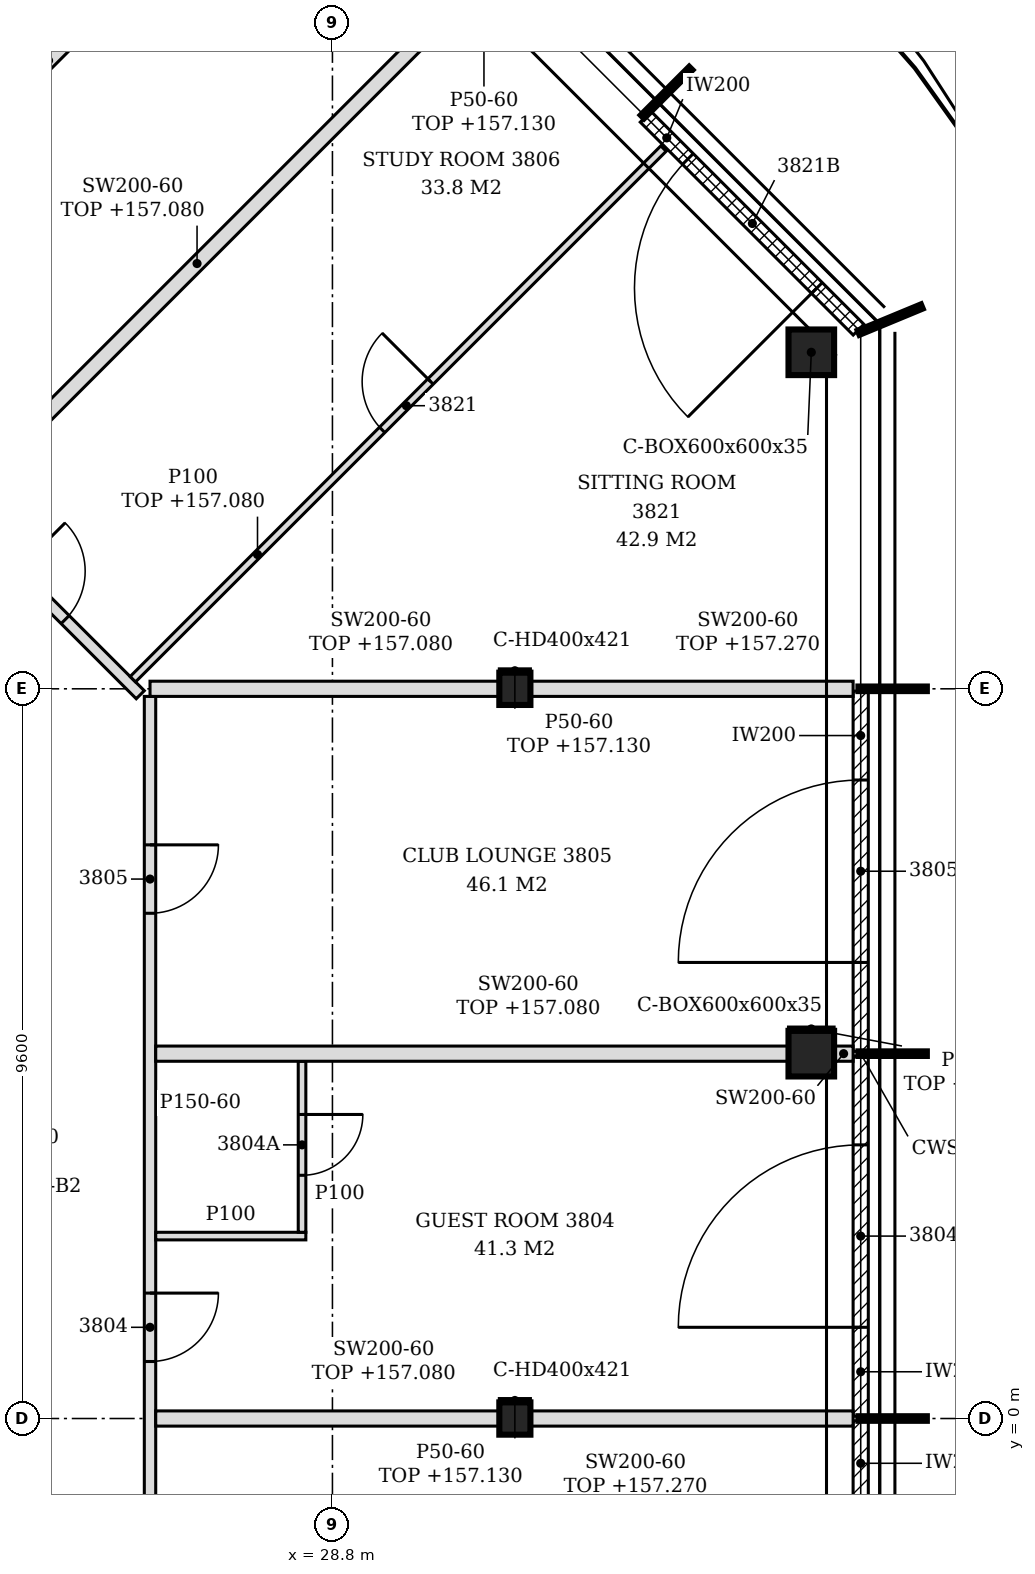
"""IFC4 building model, lengths in metres.
Left out: names, types, materials, properties, quantities, classifications, styles, units other than length and angle.
Written with IfcOpenShell. Run it as: python <this file> out.ifc"""

import sys

from ifc_helpers import new_model, si_unit, direction, frame, frame_2d, origin, origin_2d, place, context, subcontext, project, spatial, polyline, rectangle, hollow_rectangle, i_section, outline, extrude, element, fill, save


model = new_model("IFC4")
c1 = context("Model", 3, precision=1e-05, world=origin(), true_north=direction((0.0, 1.0)))
c2 = subcontext(c1, "Body", "Model", "MODEL_VIEW")
j1 = project(units=[si_unit("LENGTHUNIT", "METRE"), si_unit("PLANEANGLEUNIT", "RADIAN")], contexts=[c1])
p1 = place(None, origin())
s1 = spatial("IfcSite", under=j1, at=p1, CompositionType="ELEMENT")
p2 = place(p1, origin())
s2 = spatial("IfcBuilding", under=s1, at=p2, CompositionType="ELEMENT")
p3 = place(p2, frame((0.0, 0.0, 154.2)))
s3 = spatial("IfcBuildingStorey", under=s2, at=p3, CompositionType="ELEMENT", Elevation=154.2)
for number, where, z_axis, x_axis in (
    (1, (35.1, 4.8, -0.15), (0.0, 0.0, 1.0), (1.0, 0.0, 0.0)),
    (2, (35.1, 14.027, -0.15), (0.0, 0.0, 1.0), (1.0, 0.0, 0.0)),
):
    element("IfcColumn", number, at=place(p3, frame(where, z_axis=z_axis, x_axis=x_axis)), inside=s3, PredefinedType="COLUMN", context=c2, shape_type="SweptSolid", body=[
        extrude(hollow_rectangle(XDim=0.6, YDim=0.6, WallThickness=0.035, at=origin_2d()), origin(), (0.0, 0.0, 1.0), 3.6),
    ])
for number, where, z_axis, x_axis in (
    (3, (31.2, 0.0, -0.15), (0.0, 0.0, 1.0), (1.0, 0.0, 0.0)),
    (4, (31.2, 9.6, -0.15), (0.0, 0.0, 1.0), (1.0, 0.0, 0.0)),
):
    element("IfcColumn", number, at=place(p3, frame(where, z_axis=z_axis, x_axis=x_axis)), inside=s3, PredefinedType="COLUMN", context=c2, shape_type="SweptSolid", body=[
        extrude(i_section(OverallWidth=0.409, OverallDepth=0.425, WebThickness=0.033, FlangeThickness=0.052, FilletRadius=0.015, at=origin_2d()), origin(), (0.0, 0.0, 1.0), 3.6),
    ])
p4 = place(p3, frame((35.75, -4.656, 0.0), z_axis=(0.0, 0.0, 1.0), x_axis=(0.0, 1.0, 0.0)))
e5 = element("IfcWall", 5, at=p4, inside=s3, PredefinedType="NOTDEFINED", context=c2, shape_type="SweptSolid", body=[
    extrude(rectangle(XDim=4.626, YDim=0.2, at=frame_2d((2.313, 0.0))), origin(), (0.0, 0.0, 1.0), 3.45),
])
p5 = place(p4, frame((1.108, 0.0, 0.0)))
e6 = element("IfcOpeningElement", 6, at=p5, cuts=e5, PredefinedType="OPENING", context=c2, shape_type="SweptSolid", body=[
    extrude(rectangle(XDim=2.4, YDim=2.4, at=frame_2d((1.2, 1.2))), frame((0.0, 0.11, 0.0), z_axis=(0.0, -1.0, 0.0), x_axis=(1.0, 0.0, 0.0)), (0.0, 0.0, 1.0), 0.22),
])
p6 = place(p3, frame((35.75, 0.03, 0.0), z_axis=(0.0, 0.0, 1.0), x_axis=(0.0, 1.0, 0.0)))
e7 = element("IfcWall", 7, at=p6, inside=s3, PredefinedType="NOTDEFINED", context=c2, shape_type="SweptSolid", body=[
    extrude(rectangle(XDim=4.74, YDim=0.2, at=frame_2d((2.37, 0.0))), origin(), (0.0, 0.0, 1.0), 3.45),
])
p7 = place(p6, frame((1.17, 0.0, 0.0)))
e8 = element("IfcOpeningElement", 8, at=p7, cuts=e7, PredefinedType="OPENING", context=c2, shape_type="SweptSolid", body=[
    extrude(rectangle(XDim=2.4, YDim=2.4, at=frame_2d((1.2, 1.2))), frame((0.0, 0.11, 0.0), z_axis=(0.0, -1.0, 0.0), x_axis=(1.0, 0.0, 0.0)), (0.0, 0.0, 1.0), 0.22),
])
p8 = place(p3, frame((35.75, 4.83, 0.0), z_axis=(0.0, 0.0, 1.0), x_axis=(0.0, 1.0, 0.0)))
e9 = element("IfcWall", 9, at=p8, inside=s3, PredefinedType="NOTDEFINED", context=c2, shape_type="SweptSolid", body=[
    extrude(rectangle(XDim=4.74, YDim=0.2, at=frame_2d((2.37, 0.0))), origin(), (0.0, 0.0, 1.0), 3.45),
])
p9 = place(p8, frame((1.17, 0.0, 0.0)))
e10 = element("IfcOpeningElement", 10, at=p9, cuts=e9, PredefinedType="OPENING", context=c2, shape_type="SweptSolid", body=[
    extrude(rectangle(XDim=2.4, YDim=2.4, at=frame_2d((1.2, 1.2))), frame((0.0, 0.11, 0.0), z_axis=(0.0, -1.0, 0.0), x_axis=(1.0, 0.0, 0.0)), (0.0, 0.0, 1.0), 0.22),
])
p10 = place(p3, frame((35.722, 14.325, 0.0), z_axis=(0.0, 0.0, 1.0), x_axis=(-0.707106781187, 0.707106781187, 0.0)))
e11 = element("IfcWall", 11, at=p10, inside=s3, PredefinedType="NOTDEFINED", context=c2, shape_type="SweptSolid", body=[
    extrude(rectangle(XDim=3.962, YDim=0.2, at=frame_2d((1.981, 0.0))), origin(), (0.0, 0.0, 1.0), 3.45),
])
p11 = place(p10, frame((0.775, 0.0, 0.0)))
e12 = element("IfcOpeningElement", 12, at=p11, cuts=e11, PredefinedType="OPENING", context=c2, shape_type="SweptSolid", body=[
    extrude(rectangle(XDim=2.4, YDim=2.4, at=frame_2d((1.2, 1.2))), frame((0.0, 0.11, 0.0), z_axis=(0.0, -1.0, 0.0), x_axis=(1.0, 0.0, 0.0)), (0.0, 0.0, 1.0), 0.22),
])
p12 = place(p3, frame((26.4, -4.448, 0.0), z_axis=(0.0, 0.0, 1.0), x_axis=(0.0, 1.0, 0.0)))
e13 = element("IfcWall", 13, at=p12, inside=s3, PredefinedType="PARTITIONING", context=c2, shape_type="SweptSolid", body=[
    extrude(outline(polyline([(0.0, 0.0), (13.948, 0.0), (13.948, 2.88), (13.943, 2.88), (13.941, 3.45), (9.353, 3.45), (9.351, 2.88), (9.143, 2.88), (9.141, 3.45), (4.553, 3.45), (4.551, 2.88), (4.343, 2.88), (4.341, 3.45), (0.0, 3.45), (0.0, 0.0)])), frame((0.0, 0.075, 0.0), z_axis=(0.0, -1.0, 0.0), x_axis=(1.0, 0.0, 0.0)), (0.0, 0.0, 1.0), 0.15),
])
p13 = place(p12, frame((1.701, 0.0, 0.0)))
e14 = element("IfcOpeningElement", 14, at=p13, cuts=e13, PredefinedType="OPENING", context=c2, shape_type="SweptSolid", body=[
    extrude(rectangle(XDim=0.9, YDim=2.1, at=frame_2d((0.45, 1.05))), frame((0.0, 0.085, 0.0), z_axis=(0.0, -1.0, 0.0), x_axis=(1.0, 0.0, 0.0)), (0.0, 0.0, 1.0), 0.17),
])
p14 = place(p12, frame((5.198, 0.0, 0.0)))
e15 = element("IfcOpeningElement", 15, at=p14, cuts=e13, PredefinedType="OPENING", context=c2, shape_type="SweptSolid", body=[
    extrude(rectangle(XDim=0.9, YDim=2.1, at=frame_2d((0.45, 1.05))), frame((0.0, 0.085, 0.0), z_axis=(0.0, -1.0, 0.0), x_axis=(1.0, 0.0, 0.0)), (0.0, 0.0, 1.0), 0.17),
])
p15 = place(p12, frame((11.095, 0.0, 0.0)))
e16 = element("IfcOpeningElement", 16, at=p15, cuts=e13, PredefinedType="OPENING", context=c2, shape_type="SweptSolid", body=[
    extrude(rectangle(XDim=0.9, YDim=2.1, at=frame_2d((0.45, 1.05))), frame((0.0, 0.085, 0.0), z_axis=(0.0, -1.0, 0.0), x_axis=(1.0, 0.0, 0.0)), (0.0, 0.0, 1.0), 0.17),
])
p16 = place(p3, frame((26.475, 0.0, 0.0), z_axis=(0.0, 0.0, 1.0), x_axis=(1.0, 0.0, 0.0)))
e17 = element("IfcWall", 17, at=p16, inside=s3, PredefinedType="PARTITIONING", context=c2, shape_type="SweptSolid", body=[
    extrude(rectangle(XDim=4.521, YDim=0.2, at=frame_2d((2.26, 0.0))), origin(), (0.0, 0.0, 1.0), 2.88),
])
p17 = place(p3, frame((31.405, 0.0, 0.0), z_axis=(0.0, 0.0, 1.0), x_axis=(1.0, 0.0, 0.0)))
e18 = element("IfcWall", 18, at=p17, inside=s3, PredefinedType="PARTITIONING", context=c2, shape_type="SweptSolid", body=[
    extrude(outline(polyline([(0.0, 0.0), (4.245, 0.0), (4.246, 3.07), (3.845, 3.07), (3.844, 2.93), (3.545, 2.93), (3.543, 3.07), (0.0, 3.07), (0.0, 0.0)])), frame((0.0, 0.1, 0.0), z_axis=(0.0, -1.0, 0.0), x_axis=(1.0, 0.0, 0.0)), (0.0, 0.0, 1.0), 0.2),
])
p18 = place(p3, frame((26.475, 2.4, 0.0), z_axis=(0.0, 0.0, 1.0), x_axis=(1.0, 0.0, 0.0)))
e19 = element("IfcWall", 19, at=p18, inside=s3, PredefinedType="PARTITIONING", context=c2, shape_type="SweptSolid", body=[
    extrude(rectangle(XDim=1.975, YDim=0.1, at=frame_2d((0.987, 0.0))), origin(), (0.0, 0.0, 1.0), 3.45),
])
p19 = place(p3, frame((28.4, 2.45, 0.0), z_axis=(0.0, 0.0, 1.0), x_axis=(0.0, 1.0, 0.0)))
e20 = element("IfcWall", 20, at=p19, inside=s3, PredefinedType="PARTITIONING", context=c2, shape_type="SweptSolid", body=[
    extrude(outline(polyline([(0.0, 0.0), (2.25, 0.0), (2.25, 2.88), (2.245, 2.88), (2.243, 3.45), (0.0, 3.45), (0.0, 0.0)])), frame((0.0, 0.05, 0.0), z_axis=(0.0, -1.0, 0.0), x_axis=(1.0, 0.0, 0.0)), (0.0, 0.0, 1.0), 0.1),
])
p20 = place(p19, frame((0.75, 0.0, 0.0)))
e21 = element("IfcOpeningElement", 21, at=p20, cuts=e20, PredefinedType="OPENING", context=c2, shape_type="SweptSolid", body=[
    extrude(rectangle(XDim=0.8, YDim=2.1, at=frame_2d((0.4, 1.05))), frame((0.0, 0.06, 0.0), z_axis=(0.0, -1.0, 0.0), x_axis=(1.0, 0.0, 0.0)), (0.0, 0.0, 1.0), 0.12),
])
p21 = place(p3, frame((26.475, 4.8, 0.0), z_axis=(0.0, 0.0, 1.0), x_axis=(1.0, 0.0, 0.0)))
e22 = element("IfcWall", 22, at=p21, inside=s3, PredefinedType="PARTITIONING", context=c2, shape_type="SweptSolid", body=[
    extrude(rectangle(XDim=8.325, YDim=0.2, at=frame_2d((4.163, 0.0))), origin(), (0.0, 0.0, 1.0), 2.88),
])
p22 = place(p3, frame((35.4, 4.8, 0.0), z_axis=(0.0, 0.0, 1.0), x_axis=(1.0, 0.0, 0.0)))
e23 = element("IfcWall", 23, at=p22, inside=s3, PredefinedType="PARTITIONING", context=c2, shape_type="SweptSolid", body=[
    extrude(rectangle(XDim=0.25, YDim=0.2, at=frame_2d((0.125, 0.0))), origin(), (0.0, 0.0, 1.0), 3.45),
])
p23 = place(p3, frame((26.272, 9.522, 0.0), z_axis=(0.0, 0.0, 1.0), x_axis=(-0.707097742657, 0.707115819601, 0.0)))
e24 = element("IfcWall", 24, at=p23, inside=s3, PredefinedType="PARTITIONING", context=c2, shape_type="SweptSolid", body=[
    extrude(rectangle(XDim=13.506, YDim=0.15, at=frame_2d((6.753, 0.0))), origin(), (0.0, 0.0, 1.0), 2.73),
])
p24 = place(p23, frame((1.398, 0.0, 0.0)))
e25 = element("IfcOpeningElement", 25, at=p24, cuts=e24, PredefinedType="OPENING", context=c2, shape_type="SweptSolid", body=[
    extrude(rectangle(XDim=0.9, YDim=2.1, at=frame_2d((0.45, 1.05))), frame((0.0, 0.085, 0.0), z_axis=(0.0, -1.0, 0.0), x_axis=(1.0, 0.0, 0.0)), (0.0, 0.0, 1.0), 0.17),
])
p25 = place(p23, frame((4.668, 0.0, 0.0)))
e26 = element("IfcOpeningElement", 26, at=p25, cuts=e24, PredefinedType="OPENING", context=c2, shape_type="SweptSolid", body=[
    extrude(rectangle(XDim=0.9, YDim=2.1, at=frame_2d((0.45, 1.05))), frame((0.0, 0.085, 0.0), z_axis=(0.0, -1.0, 0.0), x_axis=(1.0, 0.0, 0.0)), (0.0, 0.0, 1.0), 0.17),
])
p26 = place(p23, frame((7.938, 0.0, 0.0)))
e27 = element("IfcOpeningElement", 27, at=p26, cuts=e24, PredefinedType="OPENING", context=c2, shape_type="SweptSolid", body=[
    extrude(rectangle(XDim=0.9, YDim=2.1, at=frame_2d((0.45, 1.05))), frame((0.0, 0.085, 0.0), z_axis=(0.0, -1.0, 0.0), x_axis=(1.0, 0.0, 0.0)), (0.0, 0.0, 1.0), 0.17),
])
p27 = place(p23, frame((11.405, 0.0, 0.0)))
e28 = element("IfcOpeningElement", 28, at=p27, cuts=e24, PredefinedType="OPENING", context=c2, shape_type="SweptSolid", body=[
    extrude(rectangle(XDim=0.9, YDim=2.1, at=frame_2d((0.45, 1.05))), frame((0.0, 0.085, 0.0), z_axis=(0.0, -1.0, 0.0), x_axis=(1.0, 0.0, 0.0)), (0.0, 0.0, 1.0), 0.17),
])
p28 = place(p3, frame((26.4, 9.6, 0.0), z_axis=(0.0, 0.0, 1.0), x_axis=(1.0, 0.0, 0.0)))
e29 = element("IfcWall", 29, at=p28, inside=s3, PredefinedType="PARTITIONING", context=c2, shape_type="SweptSolid", body=[
    extrude(rectangle(XDim=4.595, YDim=0.2, at=frame_2d((2.298, 0.0))), origin(), (0.0, 0.0, 1.0), 2.88),
])
p29 = place(p3, frame((31.405, 9.6, 0.0), z_axis=(0.0, 0.0, 1.0), x_axis=(1.0, 0.0, 0.0)))
e30 = element("IfcWall", 30, at=p29, inside=s3, PredefinedType="PARTITIONING", context=c2, shape_type="SweptSolid", body=[
    extrude(outline(polyline([(0.0, 0.0), (4.245, 0.0), (4.246, 3.07), (3.845, 3.07), (3.844, 2.93), (3.545, 2.93), (3.543, 3.07), (0.0, 3.07), (0.0, 0.0)])), frame((0.0, 0.1, 0.0), z_axis=(0.0, -1.0, 0.0), x_axis=(1.0, 0.0, 0.0)), (0.0, 0.0, 1.0), 0.2),
])
p30 = place(p3, frame((26.174, 9.726, 0.0), z_axis=(0.0, 0.0, 1.0), x_axis=(0.707106781187, 0.707106781187, 0.0)))
e31 = element("IfcWall", 31, at=p30, inside=s3, PredefinedType="PARTITIONING", context=c2, shape_type="SweptSolid", body=[
    extrude(rectangle(XDim=9.873, YDim=0.1, at=frame_2d((4.937, 0.0))), origin(), (0.0, 0.0, 1.0), 2.88),
])
p31 = place(p30, frame((4.639, 0.0, 0.0)))
e32 = element("IfcOpeningElement", 32, at=p31, cuts=e31, PredefinedType="OPENING", context=c2, shape_type="SweptSolid", body=[
    extrude(rectangle(XDim=0.9, YDim=2.1, at=frame_2d((0.45, 1.05))), frame((0.0, 0.06, 0.0), z_axis=(0.0, -1.0, 0.0), x_axis=(1.0, 0.0, 0.0)), (0.0, 0.0, 1.0), 0.12),
])
p32 = place(p3, frame((23.862, 12.038, 0.0), z_axis=(0.0, 0.0, 1.0), x_axis=(0.707106781187, 0.707106781187, 0.0)))
e33 = element("IfcWall", 33, at=p32, inside=s3, PredefinedType="PARTITIONING", context=c2, shape_type="SweptSolid", body=[
    extrude(rectangle(XDim=8.929, YDim=0.2, at=frame_2d((4.464, 0.0))), origin(), (0.0, 0.0, 1.0), 2.88),
])
p33 = place(p3, frame((21.55, 14.35, 0.0), z_axis=(0.0, 0.0, 1.0), x_axis=(0.707106781187, 0.707106781187, 0.0)))
e34 = element("IfcWall", 34, at=p33, inside=s3, PredefinedType="PARTITIONING", context=c2, shape_type="SweptSolid", body=[
    extrude(rectangle(XDim=9.943, YDim=0.2, at=frame_2d((4.972, 0.0))), origin(), (0.0, 0.0, 1.0), 2.63),
])
p34 = place(p3, frame((19.238, 16.662, 0.0), z_axis=(0.0, 0.0, 1.0), x_axis=(0.707106781187, 0.707106781187, 0.0)))
e35 = element("IfcWall", 35, at=p34, inside=s3, PredefinedType="PARTITIONING", context=c2, shape_type="SweptSolid", body=[
    extrude(rectangle(XDim=8.929, YDim=0.2, at=frame_2d((4.464, 0.0))), origin(), (0.0, 0.0, 1.0), 2.73),
])
p35 = place(p3, frame((30.996, 0.238, 0.0), z_axis=(0.0, 0.0, 1.0), x_axis=(1.0, 0.0, 0.0)))
e36 = element("IfcWall", 36, at=p35, inside=s3, PredefinedType="PARTITIONING", context=c2, shape_type="SweptSolid", body=[
    extrude(rectangle(XDim=0.409, YDim=0.05, at=frame_2d((0.205, 0.0))), origin(), (0.0, 0.0, 1.0), 2.93),
])
p36 = place(p3, frame((34.8, 5.125, 0.0), z_axis=(0.0, 0.0, 1.0), x_axis=(1.0, 0.0, 0.0)))
e37 = element("IfcWall", 37, at=p36, inside=s3, PredefinedType="PARTITIONING", context=c2, shape_type="SweptSolid", body=[
    extrude(rectangle(XDim=0.6, YDim=0.05, at=frame_2d((0.3, 0.0))), origin(), (0.0, 0.0, 1.0), 2.93),
])
p37 = place(p3, frame((30.996, 9.837, 0.0), z_axis=(0.0, 0.0, 1.0), x_axis=(1.0, 0.0, 0.0)))
e38 = element("IfcWall", 38, at=p37, inside=s3, PredefinedType="PARTITIONING", context=c2, shape_type="SweptSolid", body=[
    extrude(rectangle(XDim=0.409, YDim=0.05, at=frame_2d((0.205, 0.0))), origin(), (0.0, 0.0, 1.0), 2.93),
])
p38 = place(p7, origin())
e39 = element("IfcDoor", 39, at=p38, inside=s3, OperationType="SINGLE_SWING_LEFT", PredefinedType="DOOR", context=c2, shape_type="SweptSolid", body=[
    extrude(rectangle(XDim=2.4, YDim=2.4, at=frame_2d((1.2, 1.2))), frame((0.0, 0.025, 0.0), z_axis=(0.0, -1.0, 0.0), x_axis=(1.0, 0.0, 0.0)), (0.0, 0.0, 1.0), 0.05),
])
fill(e8, e39)
p39 = place(p9, origin())
e40 = element("IfcDoor", 40, at=p39, inside=s3, OperationType="SINGLE_SWING_LEFT", PredefinedType="DOOR", context=c2, shape_type="SweptSolid", body=[
    extrude(rectangle(XDim=2.4, YDim=2.4, at=frame_2d((1.2, 1.2))), frame((0.0, 0.025, 0.0), z_axis=(0.0, -1.0, 0.0), x_axis=(1.0, 0.0, 0.0)), (0.0, 0.0, 1.0), 0.05),
])
fill(e10, e40)
p40 = place(p11, origin())
e41 = element("IfcDoor", 41, at=p40, inside=s3, OperationType="SINGLE_SWING_LEFT", PredefinedType="DOOR", context=c2, shape_type="SweptSolid", body=[
    extrude(rectangle(XDim=2.4, YDim=2.4, at=frame_2d((1.2, 1.2))), frame((0.0, 0.025, 0.0), z_axis=(0.0, -1.0, 0.0), x_axis=(1.0, 0.0, 0.0)), (0.0, 0.0, 1.0), 0.05),
])
fill(e12, e41)
p41 = place(p14, frame((0.9, 0.0, 0.0), z_axis=(0.0, 0.0, 1.0), x_axis=(-1.0, 0.0, 0.0)))
e42 = element("IfcDoor", 42, at=p41, inside=s3, OperationType="SINGLE_SWING_LEFT", PredefinedType="DOOR", context=c2, shape_type="SweptSolid", body=[
    extrude(rectangle(XDim=0.9, YDim=2.1, at=frame_2d((0.45, 1.05))), frame((0.0, 0.025, 0.0), z_axis=(0.0, -1.0, 0.0), x_axis=(1.0, 0.0, 0.0)), (0.0, 0.0, 1.0), 0.05),
])
fill(e15, e42)
p42 = place(p20, frame((0.8, 0.0, 0.0), z_axis=(0.0, 0.0, 1.0), x_axis=(-1.0, 0.0, 0.0)))
e43 = element("IfcDoor", 43, at=p42, inside=s3, OperationType="SINGLE_SWING_LEFT", PredefinedType="DOOR", context=c2, shape_type="SweptSolid", body=[
    extrude(rectangle(XDim=0.8, YDim=2.1, at=frame_2d((0.4, 1.05))), frame((0.0, 0.025, 0.0), z_axis=(0.0, -1.0, 0.0), x_axis=(1.0, 0.0, 0.0)), (0.0, 0.0, 1.0), 0.05),
])
fill(e21, e43)
p43 = place(p15, frame((0.9, 0.0, 0.0), z_axis=(0.0, 0.0, 1.0), x_axis=(-1.0, 0.0, 0.0)))
e44 = element("IfcDoor", 44, at=p43, inside=s3, OperationType="SINGLE_SWING_LEFT", PredefinedType="DOOR", context=c2, shape_type="SweptSolid", body=[
    extrude(rectangle(XDim=0.9, YDim=2.1, at=frame_2d((0.45, 1.05))), frame((0.0, 0.025, 0.0), z_axis=(0.0, -1.0, 0.0), x_axis=(1.0, 0.0, 0.0)), (0.0, 0.0, 1.0), 0.05),
])
fill(e16, e44)
p44 = place(p24, frame((0.9, 0.0, 0.0), z_axis=(0.0, 0.0, 1.0), x_axis=(-1.0, 0.0, 0.0)))
e45 = element("IfcDoor", 45, at=p44, inside=s3, OperationType="SINGLE_SWING_LEFT", PredefinedType="DOOR", context=c2, shape_type="SweptSolid", body=[
    extrude(rectangle(XDim=0.9, YDim=2.1, at=frame_2d((0.45, 1.05))), frame((0.0, 0.025, 0.0), z_axis=(0.0, -1.0, 0.0), x_axis=(1.0, 0.0, 0.0)), (0.0, 0.0, 1.0), 0.05),
])
fill(e25, e45)
p45 = place(p31, origin())
e46 = element("IfcDoor", 46, at=p45, inside=s3, OperationType="SINGLE_SWING_RIGHT", PredefinedType="DOOR", context=c2, shape_type="SweptSolid", body=[
    extrude(rectangle(XDim=0.9, YDim=2.1, at=frame_2d((0.45, 1.05))), frame((0.0, 0.025, 0.0), z_axis=(0.0, -1.0, 0.0), x_axis=(1.0, 0.0, 0.0)), (0.0, 0.0, 1.0), 0.05),
])
fill(e32, e46)
save(model, sys.argv[1])
